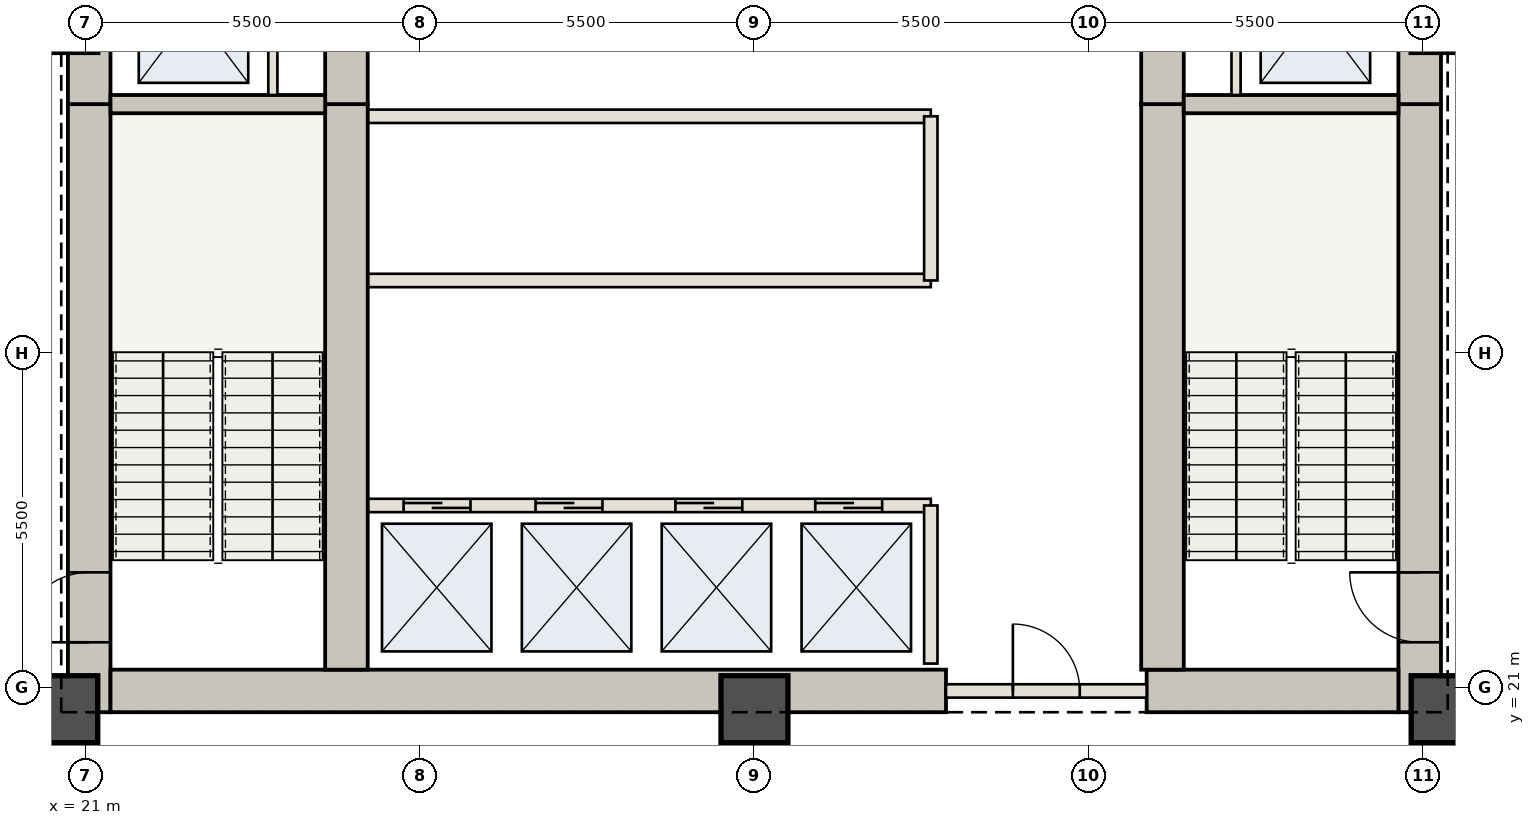
"""IFC4 building model, lengths in metres.
Left out: names, types, materials, properties, quantities, classifications, styles, units other than length and angle.
Written with IfcOpenShell. Run it as: python <this file> out.ifc"""

import sys

from ifc_helpers import new_model, si_unit, direction, frame, frame_2d, origin, origin_2d, place, context, subcontext, project, spatial, rectangle, extrude, element, fill, save


model = new_model("IFC4")
c1 = context("Model", 3, precision=1e-05, world=origin(), true_north=direction((0.0, 1.0)))
c2 = subcontext(c1, "Body", "Model", "MODEL_VIEW")
j1 = project(units=[si_unit("LENGTHUNIT", "METRE"), si_unit("PLANEANGLEUNIT", "RADIAN")], contexts=[c1])
p1 = place(None, origin())
s1 = spatial("IfcSite", under=j1, at=p1, CompositionType="ELEMENT")
p2 = place(p1, origin())
s2 = spatial("IfcBuilding", under=s1, at=p2, CompositionType="ELEMENT")
p3 = place(p2, frame((0.0, 0.0, 34.3)))
s3 = spatial("IfcBuildingStorey", under=s2, at=p3, CompositionType="ELEMENT", Elevation=34.3)
p4 = place(p3, frame((21.06, 20.6, 0.0), z_axis=(0.0, 0.0, 1.0), x_axis=(0.0, 1.0, 0.0)))
e1 = element("IfcWall", 1, at=p4, inside=s3, PredefinedType="SHEAR", context=c2, shape_type="SweptSolid", body=[
    extrude(rectangle(XDim=10.0, YDim=0.7, at=frame_2d((5.0, 0.0))), origin(), (0.0, 0.0, 1.0), 4.55),
])
p5 = place(p4, frame((1.15, 0.0, 0.0)))
e2 = element("IfcOpeningElement", 2, at=p5, cuts=e1, PredefinedType="OPENING", context=c2, shape_type="SweptSolid", body=[
    extrude(rectangle(XDim=1.15, YDim=2.15, at=frame_2d((0.575, 1.075))), frame((0.0, 0.36, 0.0), z_axis=(0.0, -1.0, 0.0), x_axis=(1.0, 0.0, 0.0)), (0.0, 0.0, 1.0), 0.72),
])
p6 = place(p3, frame((21.06, 30.6, 0.0), z_axis=(0.0, 0.0, 1.0), x_axis=(0.0, 1.0, 0.0)))
e3 = element("IfcWall", 3, at=p6, inside=s3, PredefinedType="SHEAR", context=c2, shape_type="SweptSolid", body=[
    extrude(rectangle(XDim=12.75, YDim=0.7, at=frame_2d((6.375, 0.0))), origin(), (0.0, 0.0, 1.0), 4.55),
])
p7 = place(p6, frame((4.2, 0.0, 0.0)))
e4 = element("IfcOpeningElement", 4, at=p7, cuts=e3, PredefinedType="OPENING", context=c2, shape_type="SweptSolid", body=[
    extrude(rectangle(XDim=1.1, YDim=2.15, at=frame_2d((0.55, 1.075))), frame((0.0, 0.36, 0.0), z_axis=(0.0, -1.0, 0.0), x_axis=(1.0, 0.0, 0.0)), (0.0, 0.0, 1.0), 0.72),
])
p8 = place(p6, frame((9.2, 0.0, 0.0)))
e5 = element("IfcOpeningElement", 5, at=p8, cuts=e3, PredefinedType="OPENING", context=c2, shape_type="SweptSolid", body=[
    extrude(rectangle(XDim=0.92, YDim=2.1, at=frame_2d((0.46, 1.05))), frame((0.0, 0.36, 0.0), z_axis=(0.0, -1.0, 0.0), x_axis=(1.0, 0.0, 0.0)), (0.0, 0.0, 1.0), 0.72),
])
p9 = place(p3, frame((42.94, 20.6, 0.0), z_axis=(0.0, 0.0, 1.0), x_axis=(0.0, 1.0, 0.0)))
e6 = element("IfcWall", 6, at=p9, inside=s3, PredefinedType="SHEAR", context=c2, shape_type="SweptSolid", body=[
    extrude(rectangle(XDim=10.0, YDim=0.7, at=frame_2d((5.0, 0.0))), origin(), (0.0, 0.0, 1.0), 4.55),
])
p10 = place(p9, frame((1.15, 0.0, 0.0)))
e7 = element("IfcOpeningElement", 7, at=p10, cuts=e6, PredefinedType="OPENING", context=c2, shape_type="SweptSolid", body=[
    extrude(rectangle(XDim=1.15, YDim=2.15, at=frame_2d((0.575, 1.075))), frame((0.0, 0.36, 0.0), z_axis=(0.0, -1.0, 0.0), x_axis=(1.0, 0.0, 0.0)), (0.0, 0.0, 1.0), 0.72),
])
p11 = place(p3, frame((42.94, 30.6, 0.0), z_axis=(0.0, 0.0, 1.0), x_axis=(0.0, 1.0, 0.0)))
e8 = element("IfcWall", 8, at=p11, inside=s3, PredefinedType="SHEAR", context=c2, shape_type="SweptSolid", body=[
    extrude(rectangle(XDim=12.75, YDim=0.7, at=frame_2d((6.375, 0.0))), origin(), (0.0, 0.0, 1.0), 4.55),
])
p12 = place(p11, frame((4.2, 0.0, 0.0)))
e9 = element("IfcOpeningElement", 9, at=p12, cuts=e8, PredefinedType="OPENING", context=c2, shape_type="SweptSolid", body=[
    extrude(rectangle(XDim=1.1, YDim=2.15, at=frame_2d((0.55, 1.075))), frame((0.0, 0.36, 0.0), z_axis=(0.0, -1.0, 0.0), x_axis=(1.0, 0.0, 0.0)), (0.0, 0.0, 1.0), 0.72),
])
p13 = place(p11, frame((8.4, 0.0, 0.0)))
e10 = element("IfcOpeningElement", 10, at=p13, cuts=e8, PredefinedType="OPENING", context=c2, shape_type="SweptSolid", body=[
    extrude(rectangle(XDim=0.88, YDim=2.1, at=frame_2d((0.44, 1.05))), frame((0.0, 0.36, 0.0), z_axis=(0.0, -1.0, 0.0), x_axis=(1.0, 0.0, 0.0)), (0.0, 0.0, 1.0), 0.72),
])
p14 = place(p11, frame((10.5, 0.0, 0.0)))
e11 = element("IfcOpeningElement", 11, at=p14, cuts=e8, PredefinedType="OPENING", context=c2, shape_type="SweptSolid", body=[
    extrude(rectangle(XDim=0.88, YDim=2.1, at=frame_2d((0.44, 1.05))), frame((0.0, 0.36, 0.0), z_axis=(0.0, -1.0, 0.0), x_axis=(1.0, 0.0, 0.0)), (0.0, 0.0, 1.0), 0.72),
])
p15 = place(p3, frame((21.41, 20.95, 0.0), z_axis=(0.0, 0.0, 1.0), x_axis=(1.0, 0.0, 0.0)))
e12 = element("IfcWall", 12, at=p15, inside=s3, PredefinedType="SHEAR", context=c2, shape_type="SweptSolid", body=[
    extrude(rectangle(XDim=13.74, YDim=0.7, at=frame_2d((6.87, 0.0))), origin(), (0.0, 0.0, 1.0), 4.55),
])
p16 = place(p3, frame((38.45, 20.95, 0.0), z_axis=(0.0, 0.0, 1.0), x_axis=(1.0, 0.0, 0.0)))
e13 = element("IfcWall", 13, at=p16, inside=s3, PredefinedType="SHEAR", context=c2, shape_type="SweptSolid", body=[
    extrude(rectangle(XDim=4.14, YDim=0.7, at=frame_2d((2.07, 0.0))), origin(), (0.0, 0.0, 1.0), 4.55),
])
p17 = place(p3, frame((25.29, 21.3, 0.0), z_axis=(0.0, 0.0, 1.0), x_axis=(0.0, 1.0, 0.0)))
e14 = element("IfcWall", 14, at=p17, inside=s3, PredefinedType="SHEAR", context=c2, shape_type="SweptSolid", body=[
    extrude(rectangle(XDim=9.3, YDim=0.7, at=frame_2d((4.65, 0.0))), origin(), (0.0, 0.0, 1.0), 4.55),
])
p18 = place(p3, frame((25.29, 30.6, 0.0), z_axis=(0.0, 0.0, 1.0), x_axis=(0.0, 1.0, 0.0)))
e15 = element("IfcWall", 15, at=p18, inside=s3, PredefinedType="SHEAR", context=c2, shape_type="SweptSolid", body=[
    extrude(rectangle(XDim=12.05, YDim=0.7, at=frame_2d((6.025, 0.0))), origin(), (0.0, 0.0, 1.0), 4.55),
])
p19 = place(p18, frame((6.25, 0.0, 0.0)))
e16 = element("IfcOpeningElement", 16, at=p19, cuts=e15, PredefinedType="OPENING", context=c2, shape_type="SweptSolid", body=[
    extrude(rectangle(XDim=1.1, YDim=2.15, at=frame_2d((0.55, 1.075))), frame((0.0, 0.36, 0.0), z_axis=(0.0, -1.0, 0.0), x_axis=(1.0, 0.0, 0.0)), (0.0, 0.0, 1.0), 0.72),
])
p20 = place(p3, frame((38.71, 21.3, 0.0), z_axis=(0.0, 0.0, 1.0), x_axis=(0.0, 1.0, 0.0)))
e17 = element("IfcWall", 17, at=p20, inside=s3, PredefinedType="SHEAR", context=c2, shape_type="SweptSolid", body=[
    extrude(rectangle(XDim=9.3, YDim=0.7, at=frame_2d((4.65, 0.0))), origin(), (0.0, 0.0, 1.0), 4.55),
])
p21 = place(p3, frame((38.71, 30.6, 0.0), z_axis=(0.0, 0.0, 1.0), x_axis=(0.0, 1.0, 0.0)))
e18 = element("IfcWall", 18, at=p21, inside=s3, PredefinedType="SHEAR", context=c2, shape_type="SweptSolid", body=[
    extrude(rectangle(XDim=12.05, YDim=0.7, at=frame_2d((6.025, 0.0))), origin(), (0.0, 0.0, 1.0), 4.55),
])
for number, where, z_axis, x_axis in (
    (19, (20.65, 20.65, 0.0), (0.0, 0.0, 1.0), (1.0, 0.0, 0.0)),
    (20, (32.0, 20.65, 0.0), (0.0, 0.0, 1.0), (1.0, 0.0, 0.0)),
    (21, (43.35, 20.65, 0.0), (0.0, 0.0, 1.0), (1.0, 0.0, 0.0)),
):
    element("IfcColumn", number, at=place(p3, frame(where, z_axis=z_axis, x_axis=x_axis)), inside=s3, PredefinedType="COLUMN", context=c2, shape_type="SweptSolid", body=[
        extrude(rectangle(XDim=1.1, YDim=1.1, at=origin_2d()), origin(), (0.0, 0.0, 1.0), 4.55),
    ])
for number, where, z_axis, x_axis in (
    (22, (21.41, 30.6, 0.0), (0.0, 0.0, 1.0), (1.0, 0.0, 0.0)),
    (23, (39.06, 30.6, 0.0), (0.0, 0.0, 1.0), (1.0, 0.0, 0.0)),
):
    element("IfcWall", number, at=place(p3, frame(where, z_axis=z_axis, x_axis=x_axis)), inside=s3, PredefinedType="SHEAR", context=c2, shape_type="SweptSolid", body=[
        extrude(rectangle(XDim=3.53, YDim=0.3, at=frame_2d((1.765, 0.0))), origin(), (0.0, 0.0, 1.0), 4.13),
    ])
for number, where, z_axis, x_axis in (
    (24, (24.08, 30.75, 0.0), (0.0, 0.0, 1.0), (0.0, 1.0, 0.0)),
    (25, (39.92, 30.75, 0.0), (0.0, 0.0, 1.0), (0.0, 1.0, 0.0)),
):
    element("IfcWall", number, at=place(p3, frame(where, z_axis=z_axis, x_axis=x_axis)), inside=s3, PredefinedType="STANDARD", context=c2, shape_type="SweptSolid", body=[
        extrude(rectangle(XDim=2.65, YDim=0.15, at=frame_2d((1.325, 0.0))), origin(), (0.0, 0.0, 1.0), 4.13),
    ])
p22 = place(p3, frame((35.15, 20.95, 0.0), z_axis=(0.0, 0.0, 1.0), x_axis=(1.0, 0.0, 0.0)))
e26 = element("IfcWall", 26, at=p22, inside=s3, PredefinedType="STANDARD", context=c2, shape_type="SweptSolid", body=[
    extrude(rectangle(XDim=3.3, YDim=0.22, at=frame_2d((1.65, 0.0))), origin(), (0.0, 0.0, 1.0), 4.13),
])
p23 = place(p22, frame((1.1, 0.0, 0.0)))
e27 = element("IfcOpeningElement", 27, at=p23, cuts=e26, PredefinedType="OPENING", context=c2, shape_type="SweptSolid", body=[
    extrude(rectangle(XDim=1.1, YDim=2.15, at=frame_2d((0.55, 1.075))), frame((0.0, 0.12, 0.0), z_axis=(0.0, -1.0, 0.0), x_axis=(1.0, 0.0, 0.0)), (0.0, 0.0, 1.0), 0.24),
])
p24 = place(p3, frame((25.65, 24.0, 0.0), z_axis=(0.0, 0.0, 1.0), x_axis=(1.0, 0.0, 0.0)))
e28 = element("IfcWall", 28, at=p24, inside=s3, PredefinedType="STANDARD", context=c2, shape_type="SweptSolid", body=[
    extrude(rectangle(XDim=9.25, YDim=0.22, at=frame_2d((4.625, 0.0))), origin(), (0.0, 0.0, 1.0), 4.13),
])
p25 = place(p24, frame((0.58, 0.0, 0.0)))
e29 = element("IfcOpeningElement", 29, at=p25, cuts=e28, PredefinedType="OPENING", context=c2, shape_type="SweptSolid", body=[
    extrude(rectangle(XDim=1.1, YDim=2.15, at=frame_2d((0.55, 1.075))), frame((0.0, 0.12, 0.0), z_axis=(0.0, -1.0, 0.0), x_axis=(1.0, 0.0, 0.0)), (0.0, 0.0, 1.0), 0.24),
])
p26 = place(p24, frame((2.75, 0.0, 0.0)))
e30 = element("IfcOpeningElement", 30, at=p26, cuts=e28, PredefinedType="OPENING", context=c2, shape_type="SweptSolid", body=[
    extrude(rectangle(XDim=1.1, YDim=2.15, at=frame_2d((0.55, 1.075))), frame((0.0, 0.12, 0.0), z_axis=(0.0, -1.0, 0.0), x_axis=(1.0, 0.0, 0.0)), (0.0, 0.0, 1.0), 0.24),
])
p27 = place(p24, frame((5.05, 0.0, 0.0)))
e31 = element("IfcOpeningElement", 31, at=p27, cuts=e28, PredefinedType="OPENING", context=c2, shape_type="SweptSolid", body=[
    extrude(rectangle(XDim=1.1, YDim=2.15, at=frame_2d((0.55, 1.075))), frame((0.0, 0.12, 0.0), z_axis=(0.0, -1.0, 0.0), x_axis=(1.0, 0.0, 0.0)), (0.0, 0.0, 1.0), 0.24),
])
p28 = place(p24, frame((7.35, 0.0, 0.0)))
e32 = element("IfcOpeningElement", 32, at=p28, cuts=e28, PredefinedType="OPENING", context=c2, shape_type="SweptSolid", body=[
    extrude(rectangle(XDim=1.1, YDim=2.15, at=frame_2d((0.55, 1.075))), frame((0.0, 0.12, 0.0), z_axis=(0.0, -1.0, 0.0), x_axis=(1.0, 0.0, 0.0)), (0.0, 0.0, 1.0), 0.24),
])
p29 = place(p3, frame((34.9, 21.4, 0.0), z_axis=(0.0, 0.0, 1.0), x_axis=(0.0, 1.0, 0.0)))
e33 = element("IfcWall", 33, at=p29, inside=s3, PredefinedType="STANDARD", context=c2, shape_type="SweptSolid", body=[
    extrude(rectangle(XDim=2.6, YDim=0.22, at=frame_2d((1.3, 0.0))), origin(), (0.0, 0.0, 1.0), 4.13),
])
for number, where, z_axis, x_axis in (
    (34, (25.65, 27.7, 0.0), (0.0, 0.0, 1.0), (1.0, 0.0, 0.0)),
    (35, (25.65, 30.4, 0.0), (0.0, 0.0, 1.0), (1.0, 0.0, 0.0)),
):
    element("IfcWall", number, at=place(p3, frame(where, z_axis=z_axis, x_axis=x_axis)), inside=s3, PredefinedType="STANDARD", context=c2, shape_type="SweptSolid", body=[
        extrude(rectangle(XDim=9.25, YDim=0.22, at=frame_2d((4.625, 0.0))), origin(), (0.0, 0.0, 1.0), 4.13),
    ])
p30 = place(p3, frame((34.9, 27.7, 0.0), z_axis=(0.0, 0.0, 1.0), x_axis=(0.0, 1.0, 0.0)))
e36 = element("IfcWall", 36, at=p30, inside=s3, PredefinedType="STANDARD", context=c2, shape_type="SweptSolid", body=[
    extrude(rectangle(XDim=2.7, YDim=0.22, at=frame_2d((1.35, 0.0))), origin(), (0.0, 0.0, 1.0), 4.13),
])
p31 = place(p5, origin())
e37 = element("IfcDoor", 37, at=p31, inside=s3, OperationType="SINGLE_SWING_LEFT", PredefinedType="DOOR", context=c2, shape_type="SweptSolid", body=[
    extrude(rectangle(XDim=1.15, YDim=2.15, at=frame_2d((0.575, 1.075))), frame((0.0, 0.025, 0.0), z_axis=(0.0, -1.0, 0.0), x_axis=(1.0, 0.0, 0.0)), (0.0, 0.0, 1.0), 0.05),
])
fill(e2, e37)
p32 = place(p10, origin())
e38 = element("IfcDoor", 38, at=p32, inside=s3, OperationType="SINGLE_SWING_RIGHT", PredefinedType="DOOR", context=c2, shape_type="SweptSolid", body=[
    extrude(rectangle(XDim=1.15, YDim=2.15, at=frame_2d((0.575, 1.075))), frame((0.0, 0.025, 0.0), z_axis=(0.0, -1.0, 0.0), x_axis=(1.0, 0.0, 0.0)), (0.0, 0.0, 1.0), 0.05),
])
fill(e7, e38)
p33 = place(p23, origin())
e39 = element("IfcDoor", 39, at=p33, inside=s3, OperationType="SINGLE_SWING_LEFT", PredefinedType="DOOR", context=c2, shape_type="SweptSolid", body=[
    extrude(rectangle(XDim=1.1, YDim=2.15, at=frame_2d((0.55, 1.075))), frame((0.0, 0.025, 0.0), z_axis=(0.0, -1.0, 0.0), x_axis=(1.0, 0.0, 0.0)), (0.0, 0.0, 1.0), 0.05),
])
fill(e27, e39)
p34 = place(p25, origin())
e40 = element("IfcDoor", 40, at=p34, inside=s3, OperationType="DOUBLE_DOOR_SLIDING", PredefinedType="DOOR", context=c2, shape_type="SweptSolid", body=[
    extrude(rectangle(XDim=1.1, YDim=2.15, at=frame_2d((0.55, 1.075))), frame((0.0, 0.025, 0.0), z_axis=(0.0, -1.0, 0.0), x_axis=(1.0, 0.0, 0.0)), (0.0, 0.0, 1.0), 0.05),
])
fill(e29, e40)
p35 = place(p26, origin())
e41 = element("IfcDoor", 41, at=p35, inside=s3, OperationType="DOUBLE_DOOR_SLIDING", PredefinedType="DOOR", context=c2, shape_type="SweptSolid", body=[
    extrude(rectangle(XDim=1.1, YDim=2.15, at=frame_2d((0.55, 1.075))), frame((0.0, 0.025, 0.0), z_axis=(0.0, -1.0, 0.0), x_axis=(1.0, 0.0, 0.0)), (0.0, 0.0, 1.0), 0.05),
])
fill(e30, e41)
p36 = place(p27, origin())
e42 = element("IfcDoor", 42, at=p36, inside=s3, OperationType="DOUBLE_DOOR_SLIDING", PredefinedType="DOOR", context=c2, shape_type="SweptSolid", body=[
    extrude(rectangle(XDim=1.1, YDim=2.15, at=frame_2d((0.55, 1.075))), frame((0.0, 0.025, 0.0), z_axis=(0.0, -1.0, 0.0), x_axis=(1.0, 0.0, 0.0)), (0.0, 0.0, 1.0), 0.05),
])
fill(e31, e42)
p37 = place(p28, origin())
e43 = element("IfcDoor", 43, at=p37, inside=s3, OperationType="DOUBLE_DOOR_SLIDING", PredefinedType="DOOR", context=c2, shape_type="SweptSolid", body=[
    extrude(rectangle(XDim=1.1, YDim=2.15, at=frame_2d((0.55, 1.075))), frame((0.0, 0.025, 0.0), z_axis=(0.0, -1.0, 0.0), x_axis=(1.0, 0.0, 0.0)), (0.0, 0.0, 1.0), 0.05),
])
fill(e32, e43)
save(model, sys.argv[1])
